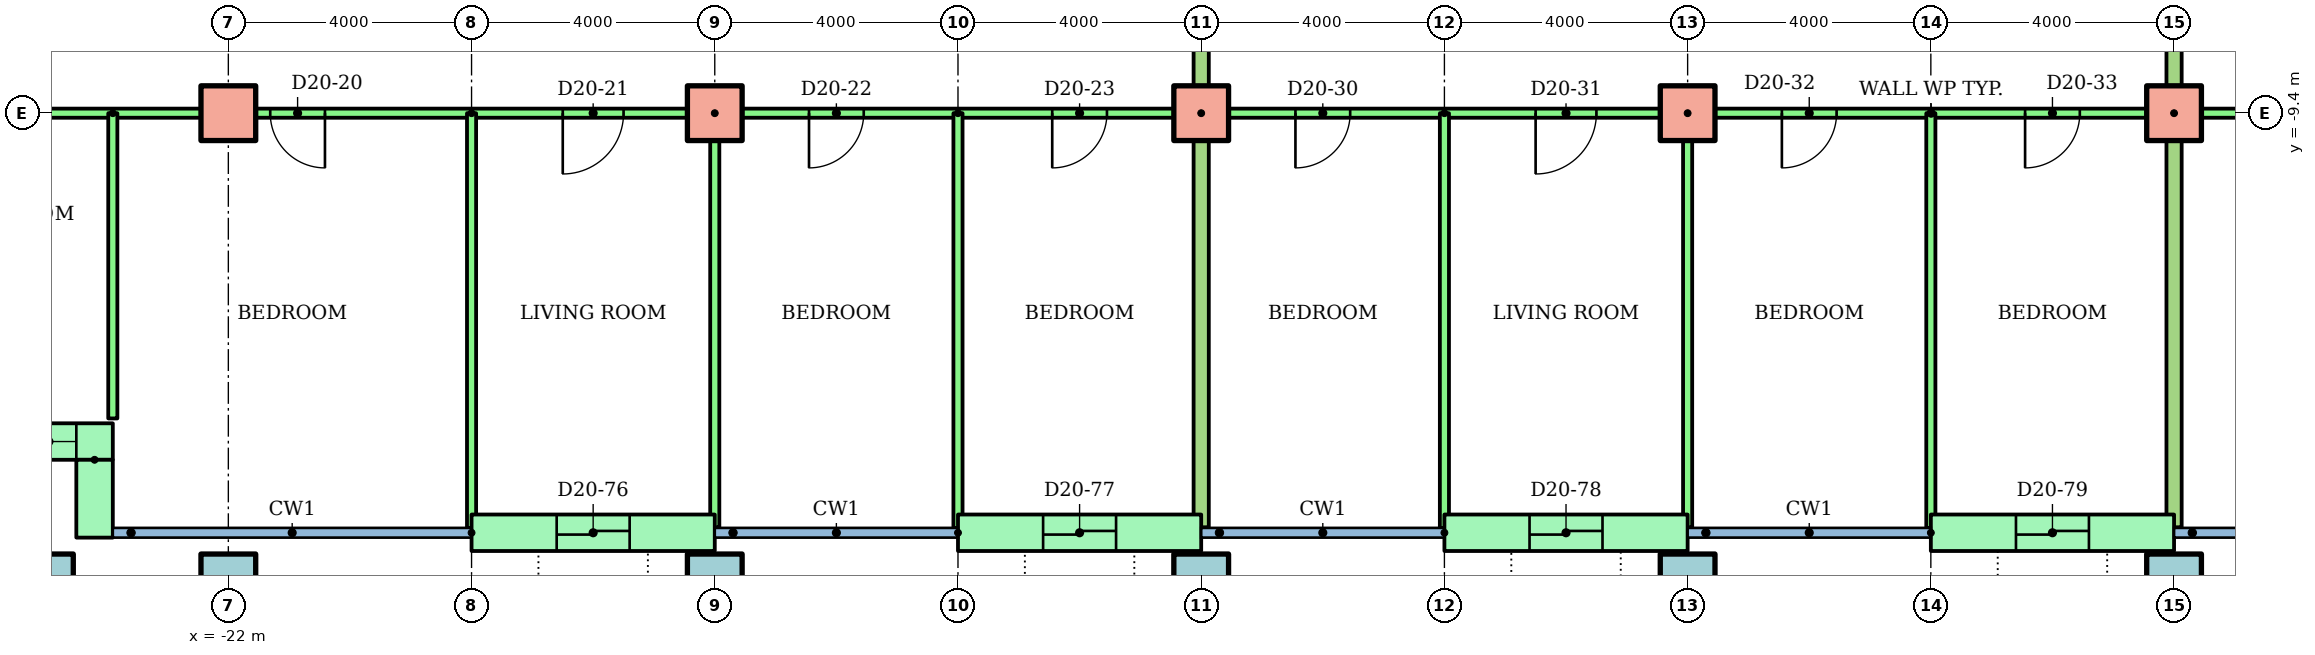
"""IFC4 building model, lengths in metres.
Left out: names, types, materials, properties, quantities, classifications, styles, units other than length and angle.
Written with IfcOpenShell. Run it as: python <this file> out.ifc"""

import sys

from ifc_helpers import new_model, si_unit, direction, frame, frame_2d, origin, origin_2d, place, context, subcontext, project, spatial, rectangle, hollow_rectangle, extrude, element, fill, save


model = new_model("IFC4")
c1 = context("Model", 3, precision=1e-05, world=origin(), true_north=direction((0.0, 1.0)))
c2 = subcontext(c1, "Body", "Model", "MODEL_VIEW")
j1 = project(units=[si_unit("LENGTHUNIT", "METRE"), si_unit("PLANEANGLEUNIT", "RADIAN")], contexts=[c1])
p1 = place(None, origin())
s1 = spatial("IfcSite", under=j1, at=p1, CompositionType="ELEMENT")
p2 = place(p1, origin())
s2 = spatial("IfcBuilding", under=s1, at=p2, CompositionType="ELEMENT")
p3 = place(p2, frame((0.0, 0.0, 80.7)))
s3 = spatial("IfcBuildingStorey", under=s2, at=p3, CompositionType="ELEMENT", Elevation=80.7)
for number, where in (
    (1, (-25.0, -17.1, 0.0)),
    (2, (-22.0, -17.1, 0.0)),
    (3, (-14.0, -17.1, 0.0)),
    (4, (-6.0, -17.1, 0.0)),
    (5, (2.0, -17.1, 0.0)),
    (6, (10.0, -17.1, 0.0)),
):
    element("IfcColumn", number, at=place(p3, frame(where)), inside=s3, PredefinedType="COLUMN", context=c2, shape_type="SweptSolid", body=[
        extrude(hollow_rectangle(XDim=0.9, YDim=0.9, WallThickness=0.045, at=origin_2d()), origin(), (0.0, 0.0, 1.0), 3.2),
    ])
for number, where in (
    (7, (-22.0, -9.4, 0.0)),
    (8, (-14.0, -9.4, 0.0)),
    (9, (-6.0, -9.4, 0.0)),
    (10, (2.0, -9.4, 0.0)),
    (11, (10.0, -9.4, 0.0)),
):
    element("IfcColumn", number, at=place(p3, frame(where)), inside=s3, PredefinedType="COLUMN", context=c2, shape_type="SweptSolid", body=[
        extrude(rectangle(XDim=0.9, YDim=0.9, at=origin_2d()), origin(), (0.0, 0.0, 1.0), 3.2),
    ])
p4 = place(p3, frame((-26.0, -14.8, 0.0)))
e12 = element("IfcWall", 12, at=p4, inside=s3, PredefinedType="STANDARD", context=c2, shape_type="SweptSolid", body=[
    extrude(rectangle(XDim=2.1, YDim=0.6, at=frame_2d((1.05, 0.0))), origin(), (0.0, 0.0, 1.0), 2.92),
])
p5 = place(p4, frame((0.6, 0.0, 0.9)))
e13 = element("IfcOpeningElement", 13, at=p5, cuts=e12, PredefinedType="OPENING", context=c2, shape_type="SweptSolid", body=[
    extrude(rectangle(XDim=0.9, YDim=1.5, at=frame_2d((0.45, 0.75))), frame((0.0, 0.31, 0.0), z_axis=(0.0, -1.0, 0.0), x_axis=(1.0, 0.0, 0.0)), (0.0, 0.0, 1.0), 0.62),
])
p6 = place(p3, frame((-24.2, -15.1, 0.0), z_axis=(0.0, 0.0, 1.0), x_axis=(0.0, -1.0, 0.0)))
e14 = element("IfcWall", 14, at=p6, inside=s3, PredefinedType="STANDARD", context=c2, shape_type="SweptSolid", body=[
    extrude(rectangle(XDim=1.28, YDim=0.6, at=frame_2d((0.64, 0.0))), origin(), (0.0, 0.0, 1.0), 2.92),
])
p7 = place(p3, frame((-18.0, -16.3, 0.0)))
e15 = element("IfcWall", 15, at=p7, inside=s3, PredefinedType="STANDARD", context=c2, shape_type="SweptSolid", body=[
    extrude(rectangle(XDim=4.0, YDim=0.6, at=frame_2d((2.0, 0.0))), origin(), (0.0, 0.0, 1.0), 2.92),
])
p8 = place(p7, frame((1.4, 0.0, 0.0)))
e16 = element("IfcOpeningElement", 16, at=p8, cuts=e15, PredefinedType="OPENING", context=c2, shape_type="SweptSolid", body=[
    extrude(rectangle(XDim=1.2, YDim=2.1, at=frame_2d((0.6, 1.05))), frame((0.0, 0.31, 0.0), z_axis=(0.0, -1.0, 0.0), x_axis=(1.0, 0.0, 0.0)), (0.0, 0.0, 1.0), 0.62),
])
p9 = place(p3, frame((-10.0, -16.3, 0.0)))
e17 = element("IfcWall", 17, at=p9, inside=s3, PredefinedType="STANDARD", context=c2, shape_type="SweptSolid", body=[
    extrude(rectangle(XDim=4.0, YDim=0.6, at=frame_2d((2.0, 0.0))), origin(), (0.0, 0.0, 1.0), 2.92),
])
p10 = place(p9, frame((1.4, 0.0, 0.0)))
e18 = element("IfcOpeningElement", 18, at=p10, cuts=e17, PredefinedType="OPENING", context=c2, shape_type="SweptSolid", body=[
    extrude(rectangle(XDim=1.2, YDim=2.1, at=frame_2d((0.6, 1.05))), frame((0.0, 0.31, 0.0), z_axis=(0.0, -1.0, 0.0), x_axis=(1.0, 0.0, 0.0)), (0.0, 0.0, 1.0), 0.62),
])
p11 = place(p3, frame((-2.0, -16.3, 0.0)))
e19 = element("IfcWall", 19, at=p11, inside=s3, PredefinedType="STANDARD", context=c2, shape_type="SweptSolid", body=[
    extrude(rectangle(XDim=4.0, YDim=0.6, at=frame_2d((2.0, 0.0))), origin(), (0.0, 0.0, 1.0), 2.92),
])
p12 = place(p11, frame((1.4, 0.0, 0.0)))
e20 = element("IfcOpeningElement", 20, at=p12, cuts=e19, PredefinedType="OPENING", context=c2, shape_type="SweptSolid", body=[
    extrude(rectangle(XDim=1.2, YDim=2.1, at=frame_2d((0.6, 1.05))), frame((0.0, 0.31, 0.0), z_axis=(0.0, -1.0, 0.0), x_axis=(1.0, 0.0, 0.0)), (0.0, 0.0, 1.0), 0.62),
])
p13 = place(p3, frame((6.0, -16.3, 0.0)))
e21 = element("IfcWall", 21, at=p13, inside=s3, PredefinedType="STANDARD", context=c2, shape_type="SweptSolid", body=[
    extrude(rectangle(XDim=4.0, YDim=0.6, at=frame_2d((2.0, 0.0))), origin(), (0.0, 0.0, 1.0), 2.92),
])
p14 = place(p13, frame((1.4, 0.0, 0.0)))
e22 = element("IfcOpeningElement", 22, at=p14, cuts=e21, PredefinedType="OPENING", context=c2, shape_type="SweptSolid", body=[
    extrude(rectangle(XDim=1.2, YDim=2.1, at=frame_2d((0.6, 1.05))), frame((0.0, 0.31, 0.0), z_axis=(0.0, -1.0, 0.0), x_axis=(1.0, 0.0, 0.0)), (0.0, 0.0, 1.0), 0.62),
])
p15 = place(p3, frame((-6.0, -9.4, 0.0), z_axis=(0.0, 0.0, 1.0), x_axis=(-1.0, 0.0, 0.0)))
e23 = element("IfcWall", 23, at=p15, inside=s3, PredefinedType="PARTITIONING", context=c2, shape_type="SweptSolid", body=[
    extrude(rectangle(XDim=22.61, YDim=0.15, at=frame_2d((11.305, 0.0))), origin(), (0.0, 0.0, 1.0), 2.4),
])
p16 = place(p15, frame((19.7, 0.0, 0.0)))
e24 = element("IfcOpeningElement", 24, at=p16, cuts=e23, PredefinedType="OPENING", context=c2, shape_type="SweptSolid", body=[
    extrude(rectangle(XDim=0.9, YDim=2.1, at=frame_2d((0.45, 1.05))), frame((0.0, 0.085, 0.0), z_axis=(0.0, -1.0, 0.0), x_axis=(1.0, 0.0, 0.0)), (0.0, 0.0, 1.0), 0.17),
])
p17 = place(p15, frame((14.411, 0.0, 0.0)))
e25 = element("IfcOpeningElement", 25, at=p17, cuts=e23, PredefinedType="OPENING", context=c2, shape_type="SweptSolid", body=[
    extrude(rectangle(XDim=0.9, YDim=2.1, at=frame_2d((0.45, 1.05))), frame((0.0, 0.085, 0.0), z_axis=(0.0, -1.0, 0.0), x_axis=(1.0, 0.0, 0.0)), (0.0, 0.0, 1.0), 0.17),
])
p18 = place(p15, frame((9.5, 0.0, 0.0)))
e26 = element("IfcOpeningElement", 26, at=p18, cuts=e23, PredefinedType="OPENING", context=c2, shape_type="SweptSolid", body=[
    extrude(rectangle(XDim=1.0, YDim=2.1, at=frame_2d((0.5, 1.05))), frame((0.0, 0.085, 0.0), z_axis=(0.0, -1.0, 0.0), x_axis=(1.0, 0.0, 0.0)), (0.0, 0.0, 1.0), 0.17),
])
p19 = place(p15, frame((5.55, 0.0, 0.0)))
e27 = element("IfcOpeningElement", 27, at=p19, cuts=e23, PredefinedType="OPENING", context=c2, shape_type="SweptSolid", body=[
    extrude(rectangle(XDim=0.9, YDim=2.1, at=frame_2d((0.45, 1.05))), frame((0.0, 0.085, 0.0), z_axis=(0.0, -1.0, 0.0), x_axis=(1.0, 0.0, 0.0)), (0.0, 0.0, 1.0), 0.17),
])
p20 = place(p15, frame((1.55, 0.0, 0.0)))
e28 = element("IfcOpeningElement", 28, at=p20, cuts=e23, PredefinedType="OPENING", context=c2, shape_type="SweptSolid", body=[
    extrude(rectangle(XDim=0.9, YDim=2.1, at=frame_2d((0.45, 1.05))), frame((0.0, 0.085, 0.0), z_axis=(0.0, -1.0, 0.0), x_axis=(1.0, 0.0, 0.0)), (0.0, 0.0, 1.0), 0.17),
])
p21 = place(p3, frame((-23.9, -9.4, 0.0), z_axis=(0.0, 0.0, 1.0), x_axis=(0.0, -1.0, 0.0)))
e29 = element("IfcWall", 29, at=p21, inside=s3, PredefinedType="PARTITIONING", context=c2, shape_type="SweptSolid", body=[
    extrude(rectangle(XDim=5.02, YDim=0.15, at=frame_2d((2.51, 0.0))), origin(), (0.0, 0.0, 1.0), 2.4),
])
p22 = place(p3, frame((-18.0, -9.4, 0.0), z_axis=(0.0, 0.0, 1.0), x_axis=(0.0, -1.0, 0.0)))
e30 = element("IfcWall", 30, at=p22, inside=s3, PredefinedType="PARTITIONING", context=c2, shape_type="SweptSolid", body=[
    extrude(rectangle(XDim=6.821, YDim=0.15, at=frame_2d((3.411, 0.0))), origin(), (0.0, 0.0, 1.0), 2.4),
])
p23 = place(p3, frame((-14.0, -9.4, 0.0), z_axis=(0.0, 0.0, 1.0), x_axis=(0.0, -1.0, 0.0)))
e31 = element("IfcWall", 31, at=p23, inside=s3, PredefinedType="PARTITIONING", context=c2, shape_type="SweptSolid", body=[
    extrude(rectangle(XDim=6.81, YDim=0.15, at=frame_2d((3.405, 0.0))), origin(), (0.0, 0.0, 1.0), 2.4),
])
p24 = place(p3, frame((-10.0, -9.4, 0.0), z_axis=(0.0, 0.0, 1.0), x_axis=(0.0, -1.0, 0.0)))
e32 = element("IfcWall", 32, at=p24, inside=s3, PredefinedType="PARTITIONING", context=c2, shape_type="SweptSolid", body=[
    extrude(rectangle(XDim=6.821, YDim=0.15, at=frame_2d((3.411, 0.0))), origin(), (0.0, 0.0, 1.0), 2.4),
])
p25 = place(p3, frame((10.0, -9.4, 0.0), z_axis=(0.0, 0.0, 1.0), x_axis=(-1.0, 0.0, 0.0)))
e33 = element("IfcWall", 33, at=p25, inside=s3, PredefinedType="PARTITIONING", context=c2, shape_type="SweptSolid", body=[
    extrude(rectangle(XDim=16.0, YDim=0.15, at=frame_2d((8.0, 0.0))), origin(), (0.0, 0.0, 1.0), 2.4),
])
p26 = place(p25, frame((13.55, 0.0, 0.0)))
e34 = element("IfcOpeningElement", 34, at=p26, cuts=e33, PredefinedType="OPENING", context=c2, shape_type="SweptSolid", body=[
    extrude(rectangle(XDim=0.9, YDim=2.1, at=frame_2d((0.45, 1.05))), frame((0.0, 0.085, 0.0), z_axis=(0.0, -1.0, 0.0), x_axis=(1.0, 0.0, 0.0)), (0.0, 0.0, 1.0), 0.17),
])
p27 = place(p25, frame((9.5, 0.0, 0.0)))
e35 = element("IfcOpeningElement", 35, at=p27, cuts=e33, PredefinedType="OPENING", context=c2, shape_type="SweptSolid", body=[
    extrude(rectangle(XDim=1.0, YDim=2.1, at=frame_2d((0.5, 1.05))), frame((0.0, 0.085, 0.0), z_axis=(0.0, -1.0, 0.0), x_axis=(1.0, 0.0, 0.0)), (0.0, 0.0, 1.0), 0.17),
])
p28 = place(p25, frame((5.55, 0.0, 0.0)))
e36 = element("IfcOpeningElement", 36, at=p28, cuts=e33, PredefinedType="OPENING", context=c2, shape_type="SweptSolid", body=[
    extrude(rectangle(XDim=0.9, YDim=2.1, at=frame_2d((0.45, 1.05))), frame((0.0, 0.085, 0.0), z_axis=(0.0, -1.0, 0.0), x_axis=(1.0, 0.0, 0.0)), (0.0, 0.0, 1.0), 0.17),
])
p29 = place(p25, frame((1.55, 0.0, 0.0)))
e37 = element("IfcOpeningElement", 37, at=p29, cuts=e33, PredefinedType="OPENING", context=c2, shape_type="SweptSolid", body=[
    extrude(rectangle(XDim=0.9, YDim=2.1, at=frame_2d((0.45, 1.05))), frame((0.0, 0.085, 0.0), z_axis=(0.0, -1.0, 0.0), x_axis=(1.0, 0.0, 0.0)), (0.0, 0.0, 1.0), 0.17),
])
p30 = place(p3, frame((-2.0, -9.4, 0.0), z_axis=(0.0, 0.0, 1.0), x_axis=(0.0, -1.0, 0.0)))
e38 = element("IfcWall", 38, at=p30, inside=s3, PredefinedType="PARTITIONING", context=c2, shape_type="SweptSolid", body=[
    extrude(rectangle(XDim=6.821, YDim=0.15, at=frame_2d((3.411, 0.0))), origin(), (0.0, 0.0, 1.0), 2.4),
])
p31 = place(p3, frame((2.0, -9.4, 0.0), z_axis=(0.0, 0.0, 1.0), x_axis=(0.0, -1.0, 0.0)))
e39 = element("IfcWall", 39, at=p31, inside=s3, PredefinedType="PARTITIONING", context=c2, shape_type="SweptSolid", body=[
    extrude(rectangle(XDim=6.81, YDim=0.15, at=frame_2d((3.405, 0.0))), origin(), (0.0, 0.0, 1.0), 2.4),
])
p32 = place(p3, frame((6.0, -9.4, 0.0), z_axis=(0.0, 0.0, 1.0), x_axis=(0.0, -1.0, 0.0)))
e40 = element("IfcWall", 40, at=p32, inside=s3, PredefinedType="PARTITIONING", context=c2, shape_type="SweptSolid", body=[
    extrude(rectangle(XDim=6.821, YDim=0.15, at=frame_2d((3.411, 0.0))), origin(), (0.0, 0.0, 1.0), 2.4),
])
p33 = place(p3, frame((-6.0, -1.4, 0.0), z_axis=(0.0, 0.0, 1.0), x_axis=(0.0, -1.0, 0.0)))
e41 = element("IfcWall", 41, at=p33, inside=s3, PredefinedType="PARTITIONING", context=c2, shape_type="SweptSolid", body=[
    extrude(rectangle(XDim=14.81, YDim=0.25, at=frame_2d((7.405, 0.0))), origin(), (0.0, 0.0, 1.0), 2.4),
])
p34 = place(p3, frame((26.0, -9.4, 0.0), z_axis=(0.0, 0.0, 1.0), x_axis=(-1.0, 0.0, 0.0)))
e42 = element("IfcWall", 42, at=p34, inside=s3, PredefinedType="PARTITIONING", context=c2, shape_type="SweptSolid", body=[
    extrude(rectangle(XDim=16.0, YDim=0.15, at=frame_2d((8.0, 0.0))), origin(), (0.0, 0.0, 1.0), 2.4),
])
p35 = place(p34, frame((13.55, 0.0, 0.0)))
e43 = element("IfcOpeningElement", 43, at=p35, cuts=e42, PredefinedType="OPENING", context=c2, shape_type="SweptSolid", body=[
    extrude(rectangle(XDim=0.9, YDim=2.1, at=frame_2d((0.45, 1.05))), frame((0.0, 0.085, 0.0), z_axis=(0.0, -1.0, 0.0), x_axis=(1.0, 0.0, 0.0)), (0.0, 0.0, 1.0), 0.17),
])
p36 = place(p34, frame((9.55, 0.0, 0.0)))
e44 = element("IfcOpeningElement", 44, at=p36, cuts=e42, PredefinedType="OPENING", context=c2, shape_type="SweptSolid", body=[
    extrude(rectangle(XDim=0.9, YDim=2.1, at=frame_2d((0.45, 1.05))), frame((0.0, 0.085, 0.0), z_axis=(0.0, -1.0, 0.0), x_axis=(1.0, 0.0, 0.0)), (0.0, 0.0, 1.0), 0.17),
])
p37 = place(p34, frame((3.5, 0.0, 0.0)))
e45 = element("IfcOpeningElement", 45, at=p37, cuts=e42, PredefinedType="OPENING", context=c2, shape_type="SweptSolid", body=[
    extrude(rectangle(XDim=1.0, YDim=2.1, at=frame_2d((0.5, 1.05))), frame((0.0, 0.085, 0.0), z_axis=(0.0, -1.0, 0.0), x_axis=(1.0, 0.0, 0.0)), (0.0, 0.0, 1.0), 0.17),
])
p38 = place(p3, frame((10.0, -1.4, 0.0), z_axis=(0.0, 0.0, 1.0), x_axis=(0.0, -1.0, 0.0)))
e46 = element("IfcWall", 46, at=p38, inside=s3, PredefinedType="PARTITIONING", context=c2, shape_type="SweptSolid", body=[
    extrude(rectangle(XDim=14.81, YDim=0.25, at=frame_2d((7.405, 0.0))), origin(), (0.0, 0.0, 1.0), 2.4),
])
p39 = place(p5, origin())
e47 = element("IfcWindow", 47, at=p39, inside=s3, PartitioningType="SINGLE_PANEL", PredefinedType="WINDOW", context=c2, shape_type="SweptSolid", body=[
    extrude(rectangle(XDim=0.9, YDim=1.5, at=frame_2d((0.45, 0.75))), frame((0.0, 0.03, 0.0), z_axis=(0.0, -1.0, 0.0), x_axis=(1.0, 0.0, 0.0)), (0.0, 0.0, 1.0), 0.06),
])
fill(e13, e47)
p40 = place(p17, origin())
e48 = element("IfcDoor", 48, at=p40, inside=s3, OperationType="SINGLE_SWING_LEFT", PredefinedType="DOOR", context=c2, shape_type="SweptSolid", body=[
    extrude(rectangle(XDim=0.9, YDim=2.1, at=frame_2d((0.45, 1.05))), frame((0.0, 0.025, 0.0), z_axis=(0.0, -1.0, 0.0), x_axis=(1.0, 0.0, 0.0)), (0.0, 0.0, 1.0), 0.05),
])
fill(e25, e48)
p41 = place(p18, origin())
e49 = element("IfcDoor", 49, at=p41, inside=s3, OperationType="SINGLE_SWING_RIGHT", PredefinedType="DOOR", context=c2, shape_type="SweptSolid", body=[
    extrude(rectangle(XDim=1.0, YDim=2.1, at=frame_2d((0.5, 1.05))), frame((0.0, 0.025, 0.0), z_axis=(0.0, -1.0, 0.0), x_axis=(1.0, 0.0, 0.0)), (0.0, 0.0, 1.0), 0.05),
])
fill(e26, e49)
p42 = place(p19, origin())
e50 = element("IfcDoor", 50, at=p42, inside=s3, OperationType="SINGLE_SWING_RIGHT", PredefinedType="DOOR", context=c2, shape_type="SweptSolid", body=[
    extrude(rectangle(XDim=0.9, YDim=2.1, at=frame_2d((0.45, 1.05))), frame((0.0, 0.025, 0.0), z_axis=(0.0, -1.0, 0.0), x_axis=(1.0, 0.0, 0.0)), (0.0, 0.0, 1.0), 0.05),
])
fill(e27, e50)
p43 = place(p20, origin())
e51 = element("IfcDoor", 51, at=p43, inside=s3, OperationType="SINGLE_SWING_RIGHT", PredefinedType="DOOR", context=c2, shape_type="SweptSolid", body=[
    extrude(rectangle(XDim=0.9, YDim=2.1, at=frame_2d((0.45, 1.05))), frame((0.0, 0.025, 0.0), z_axis=(0.0, -1.0, 0.0), x_axis=(1.0, 0.0, 0.0)), (0.0, 0.0, 1.0), 0.05),
])
fill(e28, e51)
p44 = place(p26, origin())
e52 = element("IfcDoor", 52, at=p44, inside=s3, OperationType="SINGLE_SWING_RIGHT", PredefinedType="DOOR", context=c2, shape_type="SweptSolid", body=[
    extrude(rectangle(XDim=0.9, YDim=2.1, at=frame_2d((0.45, 1.05))), frame((0.0, 0.025, 0.0), z_axis=(0.0, -1.0, 0.0), x_axis=(1.0, 0.0, 0.0)), (0.0, 0.0, 1.0), 0.05),
])
fill(e34, e52)
p45 = place(p27, origin())
e53 = element("IfcDoor", 53, at=p45, inside=s3, OperationType="SINGLE_SWING_RIGHT", PredefinedType="DOOR", context=c2, shape_type="SweptSolid", body=[
    extrude(rectangle(XDim=1.0, YDim=2.1, at=frame_2d((0.5, 1.05))), frame((0.0, 0.025, 0.0), z_axis=(0.0, -1.0, 0.0), x_axis=(1.0, 0.0, 0.0)), (0.0, 0.0, 1.0), 0.05),
])
fill(e35, e53)
p46 = place(p28, origin())
e54 = element("IfcDoor", 54, at=p46, inside=s3, OperationType="SINGLE_SWING_RIGHT", PredefinedType="DOOR", context=c2, shape_type="SweptSolid", body=[
    extrude(rectangle(XDim=0.9, YDim=2.1, at=frame_2d((0.45, 1.05))), frame((0.0, 0.025, 0.0), z_axis=(0.0, -1.0, 0.0), x_axis=(1.0, 0.0, 0.0)), (0.0, 0.0, 1.0), 0.05),
])
fill(e36, e54)
p47 = place(p29, origin())
e55 = element("IfcDoor", 55, at=p47, inside=s3, OperationType="SINGLE_SWING_RIGHT", PredefinedType="DOOR", context=c2, shape_type="SweptSolid", body=[
    extrude(rectangle(XDim=0.9, YDim=2.1, at=frame_2d((0.45, 1.05))), frame((0.0, 0.025, 0.0), z_axis=(0.0, -1.0, 0.0), x_axis=(1.0, 0.0, 0.0)), (0.0, 0.0, 1.0), 0.05),
])
fill(e37, e55)
p48 = place(p8, origin())
e56 = element("IfcDoor", 56, at=p48, inside=s3, OperationType="SLIDING_TO_LEFT", PredefinedType="DOOR", context=c2, shape_type="SweptSolid", body=[
    extrude(rectangle(XDim=1.2, YDim=2.1, at=frame_2d((0.6, 1.05))), frame((0.0, 0.025, 0.0), z_axis=(0.0, -1.0, 0.0), x_axis=(1.0, 0.0, 0.0)), (0.0, 0.0, 1.0), 0.05),
])
fill(e16, e56)
p49 = place(p10, origin())
e57 = element("IfcDoor", 57, at=p49, inside=s3, OperationType="SLIDING_TO_LEFT", PredefinedType="DOOR", context=c2, shape_type="SweptSolid", body=[
    extrude(rectangle(XDim=1.2, YDim=2.1, at=frame_2d((0.6, 1.05))), frame((0.0, 0.025, 0.0), z_axis=(0.0, -1.0, 0.0), x_axis=(1.0, 0.0, 0.0)), (0.0, 0.0, 1.0), 0.05),
])
fill(e18, e57)
p50 = place(p12, origin())
e58 = element("IfcDoor", 58, at=p50, inside=s3, OperationType="SLIDING_TO_LEFT", PredefinedType="DOOR", context=c2, shape_type="SweptSolid", body=[
    extrude(rectangle(XDim=1.2, YDim=2.1, at=frame_2d((0.6, 1.05))), frame((0.0, 0.025, 0.0), z_axis=(0.0, -1.0, 0.0), x_axis=(1.0, 0.0, 0.0)), (0.0, 0.0, 1.0), 0.05),
])
fill(e20, e58)
p51 = place(p14, origin())
e59 = element("IfcDoor", 59, at=p51, inside=s3, OperationType="SLIDING_TO_LEFT", PredefinedType="DOOR", context=c2, shape_type="SweptSolid", body=[
    extrude(rectangle(XDim=1.2, YDim=2.1, at=frame_2d((0.6, 1.05))), frame((0.0, 0.025, 0.0), z_axis=(0.0, -1.0, 0.0), x_axis=(1.0, 0.0, 0.0)), (0.0, 0.0, 1.0), 0.05),
])
fill(e22, e59)
save(model, sys.argv[1])
